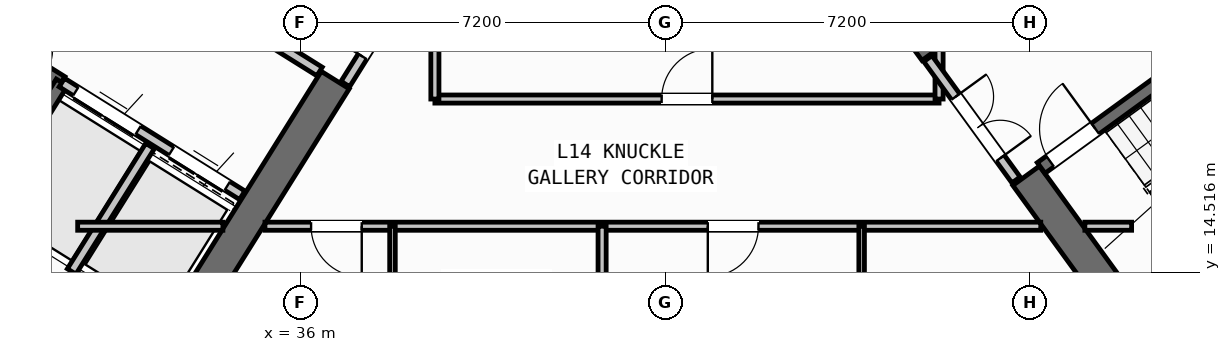
"""IFC4 building model, lengths in metres.
Left out: names, types, materials, properties, quantities, classifications, styles, units other than length and angle.
Written with IfcOpenShell. Run it as: python <this file> out.ifc"""

import sys

from ifc_helpers import new_model, si_unit, direction, frame, frame_2d, origin, place, context, subcontext, project, spatial, rectangle, extrude, source, transform, mapped, element, fill, save


model = new_model("IFC4")
c1 = context("Model", 3, precision=1e-05, world=origin(), true_north=direction((0.0, 1.0)))
c2 = subcontext(c1, "Body", "Model", "MODEL_VIEW")
j1 = project(units=[si_unit("LENGTHUNIT", "METRE"), si_unit("PLANEANGLEUNIT", "RADIAN")], contexts=[c1])
p1 = place(None, origin())
s1 = spatial("IfcSite", under=j1, at=p1, CompositionType="ELEMENT")
p2 = place(p1, origin())
s2 = spatial("IfcBuilding", under=s1, at=p2, CompositionType="ELEMENT")
p3 = place(p2, frame((0.0, 0.0, 56.4)))
s3 = spatial("IfcBuildingStorey", under=s2, at=p3, CompositionType="ELEMENT", Elevation=56.4)
p4 = place(p3, frame((33.409, 12.45, 0.0), z_axis=(0.0, 0.0, 1.0), x_axis=(-0.848051132073, 0.529914405721, 0.0)))
e1 = element("IfcWall", 1, at=p4, inside=s3, PredefinedType="SHEAR", context=c2, shape_type="SweptSolid", body=[
    extrude(rectangle(XDim=13.24, YDim=0.65, at=frame_2d((6.62, 0.0))), origin(), (0.0, 0.0, 1.0), 3.35),
])
p5 = place(p3, frame((36.683, 18.304, 0.0), z_axis=(0.0, 0.0, 1.0), x_axis=(-0.529899109053, -0.848060690178, 0.0)))
e2 = element("IfcWall", 2, at=p5, inside=s3, PredefinedType="SHEAR", context=c2, shape_type="SweptSolid", body=[
    extrude(rectangle(XDim=6.375, YDim=0.65, at=frame_2d((3.188, 0.0))), origin(), (0.0, 0.0, 1.0), 3.35),
])
p6 = place(p3, frame((52.318, 13.11, 0.0), z_axis=(0.0, 0.0, 1.0), x_axis=(0.809019445368, 0.587781878776, 0.0)))
e3 = element("IfcWall", 3, at=p6, inside=s3, PredefinedType="SHEAR", context=c2, shape_type="SweptSolid", body=[
    extrude(rectangle(XDim=12.44, YDim=0.65, at=frame_2d((6.22, 0.0))), origin(), (0.0, 0.0, 1.0), 3.35),
])
p7 = place(p3, frame((52.39, 13.564, 0.0), z_axis=(0.0, 0.0, 1.0), x_axis=(-0.58779688989, 0.809008539037, 0.0)))
e4 = element("IfcWall", 4, at=p7, inside=s3, PredefinedType="SHEAR", context=c2, shape_type="SweptSolid", body=[
    extrude(rectangle(XDim=3.525, YDim=0.65, at=frame_2d((1.763, 0.0))), origin(), (0.0, 0.0, 1.0), 3.35),
])
p8 = place(p3, frame((48.526, 18.884, 0.0), z_axis=(0.0, 0.0, 1.0), x_axis=(-0.58777996584, 0.809020835181, 0.0)))
e5 = element("IfcWall", 5, at=p8, inside=s3, PredefinedType="SHEAR", context=c2, shape_type="SweptSolid", body=[
    extrude(rectangle(XDim=6.375, YDim=0.65, at=frame_2d((3.188, 0.0))), origin(), (0.0, 0.0, 1.0), 3.35),
])
p9 = place(p3, frame((31.28, 18.261, 0.0), z_axis=(0.0, 0.0, 1.0), x_axis=(-0.848051618787, 0.529913626805, 0.0)))
e6 = element("IfcWall", 6, at=p9, inside=s3, PredefinedType="SHEAR", context=c2, shape_type="SweptSolid", body=[
    extrude(rectangle(XDim=7.46, YDim=0.26, at=frame_2d((3.73, 0.0))), origin(), (0.0, 0.0, 1.0), 3.35),
])
p10 = place(p9, frame((0.36, 0.0, 0.0)))
e7 = element("IfcOpeningElement", 7, at=p10, cuts=e6, PredefinedType="OPENING", context=c2, shape_type="SweptSolid", body=[
    extrude(rectangle(XDim=0.86, YDim=2.05, at=frame_2d((0.43, 1.025))), frame((0.0, 0.14, 0.0), z_axis=(0.0, -1.0, 0.0), x_axis=(1.0, 0.0, 0.0)), (0.0, 0.0, 1.0), 0.28),
])
p11 = place(p3, frame((31.288, 18.256, 0.0), z_axis=(0.0, 0.0, 1.0), x_axis=(-0.529943379326, -0.848033026897, 0.0)))
e8 = element("IfcWall", 8, at=p11, inside=s3, PredefinedType="SHEAR", context=c2, shape_type="SweptSolid", body=[
    extrude(rectangle(XDim=3.16, YDim=0.26, at=frame_2d((1.58, 0.0))), origin(), (0.0, 0.0, 1.0), 3.35),
])
p12 = place(p3, frame((34.848, 16.031, 0.0), z_axis=(0.0, 0.0, 1.0), x_axis=(-0.848044042236, 0.529925751807, 0.0)))
e9 = element("IfcWall", 9, at=p12, inside=s3, PredefinedType="STANDARD", context=c2, shape_type="SweptSolid", body=[
    extrude(rectangle(XDim=4.198, YDim=0.2, at=frame_2d((2.099, 0.0))), origin(), (0.0, 0.0, 1.0), 3.34),
])
p13 = place(p12, frame((0.348, 0.0, 0.0)))
e10 = element("IfcOpeningElement", 10, at=p13, cuts=e9, PredefinedType="OPENING", context=c2, shape_type="SweptSolid", body=[
    extrude(rectangle(XDim=1.3, YDim=2.2, at=frame_2d((0.65, 1.1))), frame((0.0, 0.11, 0.0), z_axis=(0.0, -1.0, 0.0), x_axis=(1.0, 0.0, 0.0)), (0.0, 0.0, 1.0), 0.22),
])
p14 = place(p12, frame((2.423, 0.0, 0.0)))
e11 = element("IfcOpeningElement", 11, at=p14, cuts=e9, PredefinedType="OPENING", context=c2, shape_type="SweptSolid", body=[
    extrude(rectangle(XDim=1.45, YDim=2.25, at=frame_2d((0.725, 1.125))), frame((0.0, 0.11, 0.0), z_axis=(0.0, -1.0, 0.0), x_axis=(1.0, 0.0, 0.0)), (0.0, 0.0, 1.0), 0.22),
])
p15 = place(p3, frame((36.374, 18.474, 0.0), z_axis=(0.0, 0.0, 1.0), x_axis=(-0.848051071577, 0.529914502535, 0.0)))
e12 = element("IfcWall", 12, at=p15, inside=s3, PredefinedType="STANDARD", context=c2, shape_type="SweptSolid", body=[
    extrude(rectangle(XDim=5.718, YDim=0.2, at=frame_2d((2.859, 0.0))), origin(), (0.0, 0.0, 1.0), 3.34),
])
p16 = place(p15, frame((2.498, 0.0, 0.0)))
e13 = element("IfcOpeningElement", 13, at=p16, cuts=e12, PredefinedType="OPENING", context=c2, shape_type="SweptSolid", body=[
    extrude(rectangle(XDim=1.15, YDim=2.1, at=frame_2d((0.575, 1.05))), frame((0.0, 0.11, 0.0), z_axis=(0.0, -1.0, 0.0), x_axis=(1.0, 0.0, 0.0)), (0.0, 0.0, 1.0), 0.22),
])
p17 = place(p3, frame((33.029, 17.003, 0.0), z_axis=(0.0, 0.0, 1.0), x_axis=(-0.529916267533, -0.848049968695, 0.0)))
e14 = element("IfcWall", 14, at=p17, inside=s3, PredefinedType="STANDARD", context=c2, shape_type="SweptSolid", body=[
    extrude(rectangle(XDim=2.92, YDim=0.2, at=frame_2d((1.46, 0.0))), origin(), (0.0, 0.0, 1.0), 3.34),
])
p18 = place(p3, frame((52.472, 14.013, 0.0), z_axis=(0.0, 0.0, 1.0), x_axis=(0.809028366311, 0.587769599847, 0.0)))
e15 = element("IfcWall", 15, at=p18, inside=s3, PredefinedType="SHEAR", context=c2, shape_type="SweptSolid", body=[
    extrude(rectangle(XDim=7.33, YDim=0.26, at=frame_2d((3.665, 0.0))), origin(), (0.0, 0.0, 1.0), 3.35),
])
p19 = place(p3, frame((50.615, 16.57, 0.0), z_axis=(0.0, 0.0, 1.0), x_axis=(0.809028366311, 0.587769599847, 0.0)))
e16 = element("IfcWall", 16, at=p19, inside=s3, PredefinedType="SHEAR", context=c2, shape_type="SweptSolid", body=[
    extrude(rectangle(XDim=7.33, YDim=0.26, at=frame_2d((3.665, 0.0))), origin(), (0.0, 0.0, 1.0), 3.35),
])
p20 = place(p19, frame((0.22, 0.0, 0.0)))
e17 = element("IfcOpeningElement", 17, at=p20, cuts=e16, PredefinedType="OPENING", context=c2, shape_type="SweptSolid", body=[
    extrude(rectangle(XDim=1.1, YDim=2.1, at=frame_2d((0.55, 1.05))), frame((0.0, 0.14, 0.0), z_axis=(0.0, -1.0, 0.0), x_axis=(1.0, 0.0, 0.0)), (0.0, 0.0, 1.0), 0.28),
])
p21 = place(p3, frame((32.164, 10.374, 0.0), z_axis=(0.0, 0.0, 1.0), x_axis=(-0.848044107957, 0.529925646633, 0.0)))
e18 = element("IfcWall", 18, at=p21, inside=s3, PredefinedType="PARTITIONING", context=c2, shape_type="SweptSolid", body=[
    extrude(rectangle(XDim=15.57, YDim=0.16, at=frame_2d((7.785, 0.0))), origin(), (0.0, 0.0, 1.0), 3.34),
])
p22 = place(p21, frame((10.83, 0.0, 0.0)))
e19 = element("IfcOpeningElement", 19, at=p22, cuts=e18, PredefinedType="OPENING", context=c2, shape_type="SweptSolid", body=[
    extrude(rectangle(XDim=1.0, YDim=2.1, at=frame_2d((0.5, 1.05))), frame((0.0, 0.09, 0.0), z_axis=(0.0, -1.0, 0.0), x_axis=(1.0, 0.0, 0.0)), (0.0, 0.0, 1.0), 0.18),
])
p23 = place(p3, frame((38.451, 20.737, 0.0), z_axis=(0.0, 0.0, 1.0), x_axis=(-0.529924799939, -0.848044637038, 0.0)))
e20 = element("IfcWall", 20, at=p23, inside=s3, PredefinedType="STANDARD", context=c2, shape_type="SweptSolid", body=[
    extrude(rectangle(XDim=2.96, YDim=0.2, at=frame_2d((1.48, 0.0))), origin(), (0.0, 0.0, 1.0), 3.34),
])
p24 = place(p23, frame((1.46, 0.0, 0.0)))
e21 = element("IfcOpeningElement", 21, at=p24, cuts=e20, PredefinedType="OPENING", context=c2, shape_type="SweptSolid", body=[
    extrude(rectangle(XDim=0.86, YDim=2.05, at=frame_2d((0.43, 1.025))), frame((0.0, 0.11, 0.0), z_axis=(0.0, -1.0, 0.0), x_axis=(1.0, 0.0, 0.0)), (0.0, 0.0, 1.0), 0.22),
])
p25 = place(p3, frame((31.6, 15.42, 0.0), z_axis=(0.0, 0.0, 1.0), x_axis=(1.0, 0.0, 0.0)))
e22 = element("IfcWall", 22, at=p25, inside=s3, PredefinedType="PARTITIONING", context=c2, shape_type="SweptSolid", body=[
    extrude(rectangle(XDim=2.866, YDim=0.16, at=frame_2d((1.433, 0.0))), origin(), (0.0, 0.0, 1.0), 3.34),
])
p26 = place(p3, frame((35.296, 15.42, 0.0), z_axis=(0.0, 0.0, 1.0), x_axis=(1.0, 0.0, 0.0)))
e23 = element("IfcWall", 23, at=p26, inside=s3, PredefinedType="PARTITIONING", context=c2, shape_type="SweptSolid", body=[
    extrude(rectangle(XDim=15.311, YDim=0.16, at=frame_2d((7.655, 0.0))), origin(), (0.0, 0.0, 1.0), 3.34),
])
p27 = place(p26, frame((0.91, 0.0, 0.0)))
e24 = element("IfcOpeningElement", 24, at=p27, cuts=e23, PredefinedType="OPENING", context=c2, shape_type="SweptSolid", body=[
    extrude(rectangle(XDim=1.0, YDim=2.1, at=frame_2d((0.5, 1.05))), frame((0.0, 0.09, 0.0), z_axis=(0.0, -1.0, 0.0), x_axis=(1.0, 0.0, 0.0)), (0.0, 0.0, 1.0), 0.18),
])
p28 = place(p26, frame((8.74, 0.0, 0.0)))
e25 = element("IfcOpeningElement", 25, at=p28, cuts=e23, PredefinedType="OPENING", context=c2, shape_type="SweptSolid", body=[
    extrude(rectangle(XDim=1.0, YDim=2.1, at=frame_2d((0.5, 1.05))), frame((0.0, 0.09, 0.0), z_axis=(0.0, -1.0, 0.0), x_axis=(1.0, 0.0, 0.0)), (0.0, 0.0, 1.0), 0.18),
])
p29 = place(p3, frame((51.477, 15.42, 0.0), z_axis=(0.0, 0.0, 1.0), x_axis=(1.0, 0.0, 0.0)))
e26 = element("IfcWall", 26, at=p29, inside=s3, PredefinedType="PARTITIONING", context=c2, shape_type="SweptSolid", body=[
    extrude(rectangle(XDim=0.923, YDim=0.16, at=frame_2d((0.461, 0.0))), origin(), (0.0, 0.0, 1.0), 3.34),
])
p30 = place(p3, frame((38.65, 17.93, 0.0), z_axis=(0.0, 0.0, 1.0), x_axis=(1.0, 0.0, 0.0)))
e27 = element("IfcWall", 27, at=p30, inside=s3, PredefinedType="PARTITIONING", context=c2, shape_type="SweptSolid", body=[
    extrude(rectangle(XDim=9.95, YDim=0.16, at=frame_2d((4.975, 0.0))), origin(), (0.0, 0.0, 1.0), 3.34),
])
p31 = place(p30, frame((4.475, 0.0, 0.0)))
e28 = element("IfcOpeningElement", 28, at=p31, cuts=e27, PredefinedType="OPENING", context=c2, shape_type="SweptSolid", body=[
    extrude(rectangle(XDim=1.0, YDim=2.1, at=frame_2d((0.5, 1.05))), frame((0.0, 0.09, 0.0), z_axis=(0.0, -1.0, 0.0), x_axis=(1.0, 0.0, 0.0)), (0.0, 0.0, 1.0), 0.18),
])
p32 = place(p3, frame((38.65, 17.93, 0.0), z_axis=(0.0, 0.0, 1.0), x_axis=(0.0, 1.0, 0.0)))
e29 = element("IfcWall", 29, at=p32, inside=s3, PredefinedType="PARTITIONING", context=c2, shape_type="SweptSolid", body=[
    extrude(rectangle(XDim=2.857, YDim=0.16, at=frame_2d((1.428, 0.0))), origin(), (0.0, 0.0, 1.0), 3.34),
])
p33 = place(p3, frame((48.6, 17.93, 0.0), z_axis=(0.0, 0.0, 1.0), x_axis=(0.0, 1.0, 0.0)))
e30 = element("IfcWall", 30, at=p33, inside=s3, PredefinedType="PARTITIONING", context=c2, shape_type="SweptSolid", body=[
    extrude(rectangle(XDim=0.993, YDim=0.16, at=frame_2d((0.496, 0.0))), origin(), (0.0, 0.0, 1.0), 3.34),
])
p34 = place(p3, frame((50.119, 16.333, 0.0), z_axis=(0.0, 0.0, 1.0), x_axis=(-0.587749856981, 0.809042709391, 0.0)))
e31 = element("IfcWall", 31, at=p34, inside=s3, PredefinedType="STANDARD", context=c2, shape_type="SweptSolid", body=[
    extrude(rectangle(XDim=2.96, YDim=0.2, at=frame_2d((1.48, 0.0))), origin(), (0.0, 0.0, 1.0), 3.34),
])
p35 = place(p34, frame((0.53, 0.0, 0.0)))
e32 = element("IfcOpeningElement", 32, at=p35, cuts=e31, PredefinedType="OPENING", context=c2, shape_type="SweptSolid", body=[
    extrude(rectangle(XDim=1.5, YDim=2.15, at=frame_2d((0.75, 1.075))), frame((0.0, 0.11, 0.0), z_axis=(0.0, -1.0, 0.0), x_axis=(1.0, 0.0, 0.0)), (0.0, 0.0, 1.0), 0.22),
])
p36 = place(p3, frame((41.95, 1.96, 0.0), z_axis=(0.0, 0.0, 1.0), x_axis=(0.0, 1.0, 0.0)))
e33 = element("IfcWall", 33, at=p36, inside=s3, PredefinedType="PARTITIONING", context=c2, shape_type="SweptSolid", body=[
    extrude(rectangle(XDim=13.46, YDim=0.16, at=frame_2d((6.73, 0.0))), origin(), (0.0, 0.0, 1.0), 3.34),
])
p37 = place(p3, frame((37.813, 1.96, 0.0), z_axis=(0.0, 0.0, 1.0), x_axis=(0.0, 1.0, 0.0)))
e34 = element("IfcWall", 34, at=p37, inside=s3, PredefinedType="PARTITIONING", context=c2, shape_type="SweptSolid", body=[
    extrude(rectangle(XDim=13.46, YDim=0.11, at=frame_2d((6.73, 0.0))), origin(), (0.0, 0.0, 1.0), 3.34),
])
p38 = place(p37, frame((5.5, 0.0, 0.0)))
e35 = element("IfcOpeningElement", 35, at=p38, cuts=e34, PredefinedType="OPENING", context=c2, shape_type="SweptSolid", body=[
    extrude(rectangle(XDim=0.92, YDim=2.08, at=frame_2d((0.46, 1.04))), frame((0.0, 0.065, 0.0), z_axis=(0.0, -1.0, 0.0), x_axis=(1.0, 0.0, 0.0)), (0.0, 0.0, 1.0), 0.13),
])
p39 = place(p37, frame((10.45, 0.0, 0.0)))
e36 = element("IfcOpeningElement", 36, at=p39, cuts=e34, PredefinedType="OPENING", context=c2, shape_type="SweptSolid", body=[
    extrude(rectangle(XDim=0.88, YDim=2.08, at=frame_2d((0.44, 1.04))), frame((0.0, 0.065, 0.0), z_axis=(0.0, -1.0, 0.0), x_axis=(1.0, 0.0, 0.0)), (0.0, 0.0, 1.0), 0.13),
])
p40 = place(p3, frame((47.072, 1.96, 0.0), z_axis=(0.0, 0.0, 1.0), x_axis=(0.0, 1.0, 0.0)))
e37 = element("IfcWall", 37, at=p40, inside=s3, PredefinedType="PARTITIONING", context=c2, shape_type="SweptSolid", body=[
    extrude(rectangle(XDim=13.46, YDim=0.11, at=frame_2d((6.73, 0.0))), origin(), (0.0, 0.0, 1.0), 3.34),
])
p41 = place(p40, frame((6.6, 0.0, 0.0)))
e38 = element("IfcOpeningElement", 38, at=p41, cuts=e37, PredefinedType="OPENING", context=c2, shape_type="SweptSolid", body=[
    extrude(rectangle(XDim=0.92, YDim=2.08, at=frame_2d((0.46, 1.04))), frame((0.0, 0.065, 0.0), z_axis=(0.0, -1.0, 0.0), x_axis=(1.0, 0.0, 0.0)), (0.0, 0.0, 1.0), 0.13),
])
p42 = place(p40, frame((11.1, 0.0, 0.0)))
e39 = element("IfcOpeningElement", 39, at=p42, cuts=e37, PredefinedType="OPENING", context=c2, shape_type="SweptSolid", body=[
    extrude(rectangle(XDim=0.88, YDim=2.08, at=frame_2d((0.44, 1.04))), frame((0.0, 0.065, 0.0), z_axis=(0.0, -1.0, 0.0), x_axis=(1.0, 0.0, 0.0)), (0.0, 0.0, 1.0), 0.13),
])
m1 = source(origin(), c2, "Body", "SweptSolid", [
    extrude(rectangle(XDim=1.3, YDim=2.2, at=frame_2d((0.65, 1.1))), frame((0.0, 0.025, 0.0), z_axis=(0.0, -1.0, 0.0), x_axis=(1.0, 0.0, 0.0)), (0.0, 0.0, 1.0), 0.05),
])
p43 = place(p13, origin())
e40 = element("IfcDoor", 40, at=p43, inside=s3, OperationType="DOUBLE_DOOR_SLIDING", PredefinedType="DOOR", context=c2, shape_type="MappedRepresentation", body=[
    mapped(m1, transform((0.0, 0.0, 0.0), scale=1.0)),
])
fill(e10, e40)
m2 = source(origin(), c2, "Body", "SweptSolid", [
    extrude(rectangle(XDim=1.45, YDim=2.25, at=frame_2d((0.725, 1.125))), frame((0.0, 0.025, 0.0), z_axis=(0.0, -1.0, 0.0), x_axis=(1.0, 0.0, 0.0)), (0.0, 0.0, 1.0), 0.05),
])
p44 = place(p14, origin())
e41 = element("IfcDoor", 41, at=p44, inside=s3, OperationType="DOUBLE_DOOR_SLIDING", PredefinedType="DOOR", context=c2, shape_type="MappedRepresentation", body=[
    mapped(m2, transform((0.0, 0.0, 0.0), scale=1.0)),
])
fill(e11, e41)
m3 = source(origin(), c2, "Body", "SweptSolid", [
    extrude(rectangle(XDim=1.1, YDim=2.1, at=frame_2d((0.55, 1.05))), frame((0.0, 0.025, 0.0), z_axis=(0.0, -1.0, 0.0), x_axis=(1.0, 0.0, 0.0)), (0.0, 0.0, 1.0), 0.05),
])
p45 = place(p20, origin())
e42 = element("IfcDoor", 42, at=p45, inside=s3, OperationType="SINGLE_SWING_RIGHT", PredefinedType="DOOR", context=c2, shape_type="MappedRepresentation", body=[
    mapped(m3, transform((0.0, 0.0, 0.0), scale=1.0)),
])
fill(e17, e42)
m4 = source(origin(), c2, "Body", "SweptSolid", [
    extrude(rectangle(XDim=1.0, YDim=2.1, at=frame_2d((0.5, 1.05))), frame((0.0, 0.025, 0.0), z_axis=(0.0, -1.0, 0.0), x_axis=(1.0, 0.0, 0.0)), (0.0, 0.0, 1.0), 0.05),
])
p46 = place(p31, origin())
e43 = element("IfcDoor", 43, at=p46, inside=s3, OperationType="SINGLE_SWING_RIGHT", PredefinedType="DOOR", context=c2, shape_type="MappedRepresentation", body=[
    mapped(m4, transform((0.0, 0.0, 0.0), scale=1.0)),
])
fill(e28, e43)
m5 = source(origin(), c2, "Body", "SweptSolid", [
    extrude(rectangle(XDim=0.86, YDim=2.05, at=frame_2d((0.43, 1.025))), frame((0.0, 0.025, 0.0), z_axis=(0.0, -1.0, 0.0), x_axis=(1.0, 0.0, 0.0)), (0.0, 0.0, 1.0), 0.05),
])
p47 = place(p24, frame((0.86, 0.0, 0.0), z_axis=(0.0, 0.0, 1.0), x_axis=(-1.0, 0.0, 0.0)))
e44 = element("IfcDoor", 44, at=p47, inside=s3, OperationType="SINGLE_SWING_LEFT", PredefinedType="DOOR", context=c2, shape_type="MappedRepresentation", body=[
    mapped(m5, transform((0.0, 0.0, 0.0), scale=1.0)),
])
fill(e21, e44)
m6 = source(origin(), c2, "Body", "SweptSolid", [
    extrude(rectangle(XDim=1.5, YDim=2.15, at=frame_2d((0.75, 1.075))), frame((0.0, 0.025, 0.0), z_axis=(0.0, -1.0, 0.0), x_axis=(1.0, 0.0, 0.0)), (0.0, 0.0, 1.0), 0.05),
])
p48 = place(p35, frame((1.5, 0.0, 0.0), z_axis=(0.0, 0.0, 1.0), x_axis=(-1.0, 0.0, 0.0)))
e45 = element("IfcDoor", 45, at=p48, inside=s3, OperationType="DOUBLE_DOOR_SINGLE_SWING", PredefinedType="DOOR", context=c2, shape_type="MappedRepresentation", body=[
    mapped(m6, transform((0.0, 0.0, 0.0), scale=1.0)),
])
fill(e32, e45)
p49 = place(p27, frame((1.0, 0.0, 0.0), z_axis=(0.0, 0.0, 1.0), x_axis=(-1.0, 0.0, 0.0)))
e46 = element("IfcDoor", 46, at=p49, inside=s3, OperationType="SINGLE_SWING_LEFT", PredefinedType="DOOR", context=c2, shape_type="MappedRepresentation", body=[
    mapped(m4, transform((0.0, 0.0, 0.0), scale=1.0)),
])
fill(e24, e46)
p50 = place(p28, frame((1.0, 0.0, 0.0), z_axis=(0.0, 0.0, 1.0), x_axis=(-1.0, 0.0, 0.0)))
e47 = element("IfcDoor", 47, at=p50, inside=s3, OperationType="SINGLE_SWING_RIGHT", PredefinedType="DOOR", context=c2, shape_type="MappedRepresentation", body=[
    mapped(m4, transform((0.0, 0.0, 0.0), scale=1.0)),
])
fill(e25, e47)
save(model, sys.argv[1])
